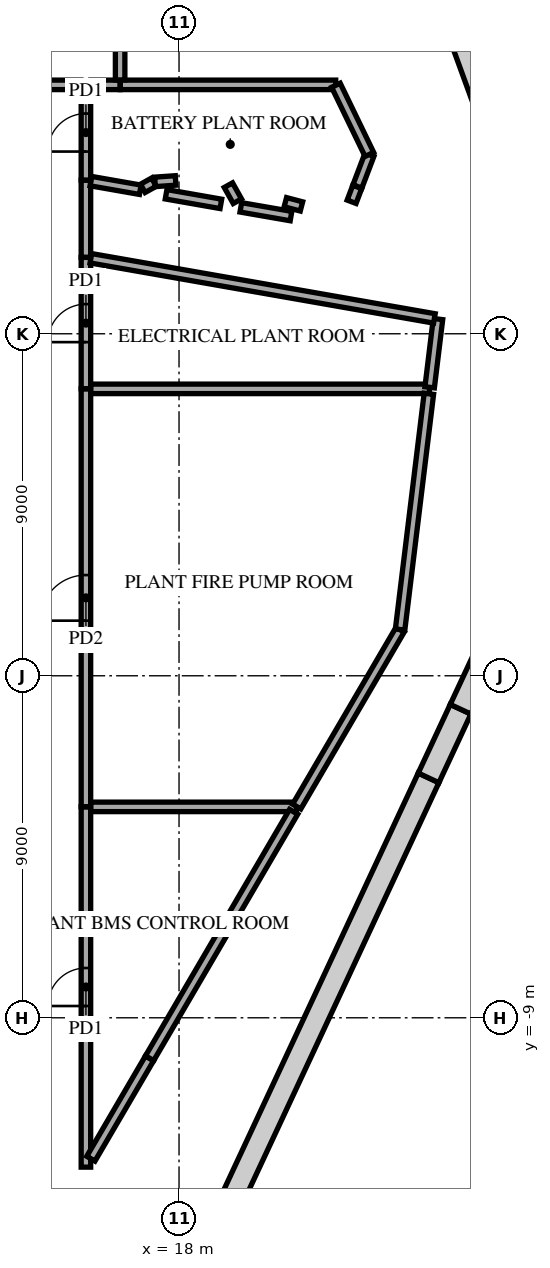
"""IFC4 building model, lengths in metres.
Left out: names, types, materials, properties, quantities, classifications, styles, units other than length and angle.
Written with IfcOpenShell. Run it as: python <this file> out.ifc"""

import sys

from ifc_helpers import new_model, si_unit, direction, frame, frame_2d, origin, place, context, subcontext, project, spatial, rectangle, extrude, element, fill, save


model = new_model("IFC4")
c1 = context("Model", 3, precision=1e-05, world=origin(), true_north=direction((0.0, 1.0)))
c2 = subcontext(c1, "Body", "Model", "MODEL_VIEW")
j1 = project(units=[si_unit("LENGTHUNIT", "METRE"), si_unit("PLANEANGLEUNIT", "RADIAN")], contexts=[c1])
p1 = place(None, origin())
s1 = spatial("IfcSite", under=j1, at=p1, CompositionType="ELEMENT")
p2 = place(p1, origin())
s2 = spatial("IfcBuilding", under=s1, at=p2, CompositionType="ELEMENT")
p3 = place(p2, frame((0.0, 0.0, 290.9)))
s3 = spatial("IfcBuildingStorey", under=s2, at=p3, CompositionType="ELEMENT", Elevation=290.9)
p4 = place(p3, frame((15.55, -12.93, 0.0), z_axis=(0.0, 0.0, 1.0), x_axis=(0.0, 1.0, 0.0)))
e1 = element("IfcWall", 1, at=p4, inside=s3, PredefinedType="PARTITIONING", context=c2, shape_type="SweptSolid", body=[
    extrude(rectangle(XDim=9.48, YDim=0.25, at=frame_2d((4.74, 0.0))), origin(), (0.0, 0.0, 1.0), 4.73),
])
p5 = place(p4, frame((4.24, 0.0, 0.0)))
e2 = element("IfcOpeningElement", 2, at=p5, cuts=e1, PredefinedType="OPENING", context=c2, shape_type="SweptSolid", body=[
    extrude(rectangle(XDim=1.0, YDim=2.1, at=frame_2d((0.5, 1.05))), frame((0.0, 0.135, 0.0), z_axis=(0.0, -1.0, 0.0), x_axis=(1.0, 0.0, 0.0)), (0.0, 0.0, 1.0), 0.27),
])
p6 = place(p3, frame((15.68, -12.708, 0.0), z_axis=(0.0, 0.0, 1.0), x_axis=(0.504610530245, 0.863347098661, 0.0)))
e3 = element("IfcWall", 3, at=p6, inside=s3, PredefinedType="PARTITIONING", context=c2, shape_type="SweptSolid", body=[
    extrude(rectangle(XDim=3.058, YDim=0.25, at=frame_2d((1.529, 0.0))), origin(), (0.0, 0.0, 1.0), 4.73),
])
p7 = place(p3, frame((15.55, -3.445, 0.0), z_axis=(0.0, 0.0, 1.0), x_axis=(0.0, 1.0, 0.0)))
e4 = element("IfcWall", 4, at=p7, inside=s3, PredefinedType="PARTITIONING", context=c2, shape_type="SweptSolid", body=[
    extrude(rectangle(XDim=10.995, YDim=0.25, at=frame_2d((5.498, 0.0))), origin(), (0.0, 0.0, 1.0), 4.73),
])
p8 = place(p7, frame((4.895, 0.0, 0.0)))
e5 = element("IfcOpeningElement", 5, at=p8, cuts=e4, PredefinedType="OPENING", context=c2, shape_type="SweptSolid", body=[
    extrude(rectangle(XDim=1.2, YDim=2.1, at=frame_2d((0.6, 1.05))), frame((0.0, 0.135, 0.0), z_axis=(0.0, -1.0, 0.0), x_axis=(1.0, 0.0, 0.0)), (0.0, 0.0, 1.0), 0.27),
])
p9 = place(p3, frame((15.68, -3.45, 0.0), z_axis=(0.0, 0.0, 1.0), x_axis=(1.0, 0.0, 0.0)))
e6 = element("IfcWall", 6, at=p9, inside=s3, PredefinedType="PARTITIONING", context=c2, shape_type="SweptSolid", body=[
    extrude(rectangle(XDim=5.412, YDim=0.25, at=frame_2d((2.706, 0.0))), origin(), (0.0, 0.0, 1.0), 5.25),
])
p10 = place(p3, frame((17.226, -10.064, 0.0), z_axis=(0.0, 0.0, 1.0), x_axis=(0.504657076942, 0.863319891287, 0.0)))
e7 = element("IfcWall", 7, at=p10, inside=s3, PredefinedType="PARTITIONING", context=c2, shape_type="SweptSolid", body=[
    extrude(rectangle(XDim=7.51, YDim=0.25, at=frame_2d((3.755, 0.0))), origin(), (0.0, 0.0, 1.0), 4.73),
])
p11 = place(p3, frame((21.097, -3.441, 0.0), z_axis=(0.0, 0.0, 1.0), x_axis=(0.504676330885, 0.86330863603, 0.0)))
e8 = element("IfcWall", 8, at=p11, inside=s3, PredefinedType="PARTITIONING", context=c2, shape_type="SweptSolid", body=[
    extrude(rectangle(XDim=5.39, YDim=0.25, at=frame_2d((2.695, 0.0))), origin(), (0.0, 0.0, 1.0), 4.73),
])
p12 = place(p3, frame((15.55, 7.555, 0.0), z_axis=(0.0, 0.0, 1.0), x_axis=(0.0, 1.0, 0.0)))
e9 = element("IfcWall", 9, at=p12, inside=s3, PredefinedType="PARTITIONING", context=c2, shape_type="SweptSolid", body=[
    extrude(rectangle(XDim=3.455, YDim=0.25, at=frame_2d((1.727, 0.0))), origin(), (0.0, 0.0, 1.0), 4.73),
])
p13 = place(p12, frame((1.225, 0.0, 0.0)))
e10 = element("IfcOpeningElement", 10, at=p13, cuts=e9, PredefinedType="OPENING", context=c2, shape_type="SweptSolid", body=[
    extrude(rectangle(XDim=1.0, YDim=2.1, at=frame_2d((0.5, 1.05))), frame((0.0, 0.135, 0.0), z_axis=(0.0, -1.0, 0.0), x_axis=(1.0, 0.0, 0.0)), (0.0, 0.0, 1.0), 0.27),
])
p14 = place(p3, frame((15.68, 7.55, 0.0), z_axis=(0.0, 0.0, 1.0), x_axis=(1.0, 0.0, 0.0)))
e11 = element("IfcWall", 11, at=p14, inside=s3, PredefinedType="PARTITIONING", context=c2, shape_type="SweptSolid", body=[
    extrude(rectangle(XDim=8.91, YDim=0.25, at=frame_2d((4.455, 0.0))), origin(), (0.0, 0.0, 1.0), 5.25),
])
p15 = place(p3, frame((23.817, 1.217, 0.0), z_axis=(0.0, 0.0, 1.0), x_axis=(0.121149204596, 0.992634308407, 0.0)))
e12 = element("IfcWall", 12, at=p15, inside=s3, PredefinedType="PARTITIONING", context=c2, shape_type="SweptSolid", body=[
    extrude(rectangle(XDim=6.249, YDim=0.25, at=frame_2d((3.125, 0.0))), origin(), (0.0, 0.0, 1.0), 4.73),
])
p16 = place(p3, frame((24.595, 7.591, 0.0), z_axis=(0.0, 0.0, 1.0), x_axis=(0.121161380242, 0.992632822315, 0.0)))
e13 = element("IfcWall", 13, at=p16, inside=s3, PredefinedType="PARTITIONING", context=c2, shape_type="SweptSolid", body=[
    extrude(rectangle(XDim=1.81, YDim=0.25, at=frame_2d((0.905, 0.0))), origin(), (0.0, 0.0, 1.0), 5.25),
])
p17 = place(p3, frame((15.55, 11.014, 0.0), z_axis=(0.0, 0.0, 1.0), x_axis=(0.0, 1.0, 0.0)))
e14 = element("IfcWall", 14, at=p17, inside=s3, PredefinedType="PARTITIONING", context=c2, shape_type="SweptSolid", body=[
    extrude(rectangle(XDim=2.025, YDim=0.25, at=frame_2d((1.013, 0.0))), origin(), (0.0, 0.0, 1.0), 5.25),
])
p18 = place(p3, frame((15.68, 10.987, 0.0), z_axis=(0.0, 0.0, 1.0), x_axis=(0.985009567224, -0.172499717323, 0.0)))
e15 = element("IfcWall", 15, at=p18, inside=s3, PredefinedType="PARTITIONING", context=c2, shape_type="SweptSolid", body=[
    extrude(rectangle(XDim=9.177, YDim=0.25, at=frame_2d((4.588, 0.0))), origin(), (0.0, 0.0, 1.0), 4.73),
])
p19 = place(p3, frame((19.626, 12.326, 0.0), z_axis=(0.0, 0.0, 1.0), x_axis=(0.985238475206, -0.171187461496, 0.0)))
e16 = element("IfcWall", 16, at=p19, inside=s3, PredefinedType="PARTITIONING", context=c2, shape_type="SweptSolid", body=[
    extrude(rectangle(XDim=1.341, YDim=0.25, at=frame_2d((0.67, 0.0))), origin(), (0.0, 0.0, 1.0), 5.25),
])
p20 = place(p3, frame((20.798, 12.462, 0.0), z_axis=(0.0, 0.0, 1.0), x_axis=(0.966951840267, -0.254959092022, 0.0)))
e17 = element("IfcWall", 17, at=p20, inside=s3, PredefinedType="PARTITIONING", context=c2, shape_type="SweptSolid", body=[
    extrude(rectangle(XDim=0.438, YDim=0.25, at=frame_2d((0.219, 0.0))), origin(), (0.0, 0.0, 1.0), 5.25),
])
p21 = place(p3, frame((17.66, 12.67, 0.0), z_axis=(0.0, 0.0, 1.0), x_axis=(0.985007795471, -0.172509834098, 0.0)))
e18 = element("IfcWall", 18, at=p21, inside=s3, PredefinedType="PARTITIONING", context=c2, shape_type="SweptSolid", body=[
    extrude(rectangle(XDim=1.463, YDim=0.25, at=frame_2d((0.732, 0.0))), origin(), (0.0, 0.0, 1.0), 5.25),
])
p22 = place(p3, frame((19.299, 12.91, 0.0), z_axis=(0.0, 0.0, 1.0), x_axis=(0.488126794077, -0.872772726948, 0.0)))
e19 = element("IfcWall", 19, at=p22, inside=s3, PredefinedType="PARTITIONING", context=c2, shape_type="SweptSolid", body=[
    extrude(rectangle(XDim=0.484, YDim=0.25, at=frame_2d((0.242, 0.0))), origin(), (0.0, 0.0, 1.0), 5.25),
])
p23 = place(p3, frame((15.68, 13.017, 0.0), z_axis=(0.0, 0.0, 1.0), x_axis=(0.985021041015, -0.172434186744, 0.0)))
e20 = element("IfcWall", 20, at=p23, inside=s3, PredefinedType="PARTITIONING", context=c2, shape_type="SweptSolid", body=[
    extrude(rectangle(XDim=1.32, YDim=0.25, at=frame_2d((0.66, 0.0))), origin(), (0.0, 0.0, 1.0), 5.25),
])
p24 = place(p3, frame((22.541, 12.473, 0.0), z_axis=(0.0, 0.0, 1.0), x_axis=(0.354513380096, 0.935050941571, 0.0)))
e21 = element("IfcWall", 21, at=p24, inside=s3, PredefinedType="PARTITIONING", context=c2, shape_type="SweptSolid", body=[
    extrude(rectangle(XDim=0.418, YDim=0.25, at=frame_2d((0.209, 0.0))), origin(), (0.0, 0.0, 1.0), 5.25),
])
p25 = place(p3, frame((17.046, 12.826, 0.0), z_axis=(0.0, 0.0, 1.0), x_axis=(0.874843598419, 0.484405489549, 0.0)))
e22 = element("IfcWall", 22, at=p25, inside=s3, PredefinedType="PARTITIONING", context=c2, shape_type="SweptSolid", body=[
    extrude(rectangle(XDim=0.335, YDim=0.25, at=frame_2d((0.167, 0.0))), origin(), (0.0, 0.0, 1.0), 5.25),
])
p26 = place(p3, frame((17.368, 12.997, 0.0), z_axis=(0.0, 0.0, 1.0), x_axis=(0.997609037461, 0.069110117755, 0.0)))
e23 = element("IfcWall", 23, at=p26, inside=s3, PredefinedType="PARTITIONING", context=c2, shape_type="SweptSolid", body=[
    extrude(rectangle(XDim=0.544, YDim=0.25, at=frame_2d((0.272, 0.0))), origin(), (0.0, 0.0, 1.0), 5.25),
])
p27 = place(p3, frame((15.55, 13.045, 0.0), z_axis=(0.0, 0.0, 1.0), x_axis=(0.0, 1.0, 0.0)))
e24 = element("IfcWall", 24, at=p27, inside=s3, PredefinedType="PARTITIONING", context=c2, shape_type="SweptSolid", body=[
    extrude(rectangle(XDim=2.505, YDim=0.25, at=frame_2d((1.252, 0.0))), origin(), (0.0, 0.0, 1.0), 4.73),
])
p28 = place(p27, frame((0.75, 0.0, 0.0)))
e25 = element("IfcOpeningElement", 25, at=p28, cuts=e24, PredefinedType="OPENING", context=c2, shape_type="SweptSolid", body=[
    extrude(rectangle(XDim=1.0, YDim=2.1, at=frame_2d((0.5, 1.05))), frame((0.0, 0.135, 0.0), z_axis=(0.0, -1.0, 0.0), x_axis=(1.0, 0.0, 0.0)), (0.0, 0.0, 1.0), 0.27),
])
p29 = place(p3, frame((22.694, 12.877, 0.0), z_axis=(0.0, 0.0, 1.0), x_axis=(0.35491738189, 0.934897669284, 0.0)))
e26 = element("IfcWall", 26, at=p29, inside=s3, PredefinedType="PARTITIONING", context=c2, shape_type="SweptSolid", body=[
    extrude(rectangle(XDim=0.895, YDim=0.25, at=frame_2d((0.448, 0.0))), origin(), (0.0, 0.0, 1.0), 5.25),
])
p30 = place(p3, frame((5.455, 15.55, 0.0), z_axis=(0.0, 0.0, 1.0), x_axis=(1.0, 0.0, 0.0)))
e27 = element("IfcWall", 27, at=p30, inside=s3, PredefinedType="PARTITIONING", context=c2, shape_type="SweptSolid", body=[
    extrude(rectangle(XDim=9.965, YDim=0.25, at=frame_2d((4.982, 0.0))), origin(), (0.0, 0.0, 1.0), 4.73),
])
p31 = place(p30, frame((4.445, 0.0, 0.0)))
e28 = element("IfcOpeningElement", 28, at=p31, cuts=e27, PredefinedType="OPENING", context=c2, shape_type="SweptSolid", body=[
    extrude(rectangle(XDim=1.2, YDim=2.1, at=frame_2d((0.6, 1.05))), frame((0.0, 0.135, 0.0), z_axis=(0.0, -1.0, 0.0), x_axis=(1.0, 0.0, 0.0)), (0.0, 0.0, 1.0), 0.27),
])
p32 = place(p3, frame((15.68, 15.55, 0.0), z_axis=(0.0, 0.0, 1.0), x_axis=(1.0, 0.0, 0.0)))
e29 = element("IfcWall", 29, at=p32, inside=s3, PredefinedType="PARTITIONING", context=c2, shape_type="SweptSolid", body=[
    extrude(rectangle(XDim=0.77, YDim=0.25, at=frame_2d((0.385, 0.0))), origin(), (0.0, 0.0, 1.0), 5.25),
])
p33 = place(p3, frame((16.455, 15.55, 0.0), z_axis=(0.0, 0.0, 1.0), x_axis=(1.0, 0.0, 0.0)))
e30 = element("IfcWall", 30, at=p33, inside=s3, PredefinedType="PARTITIONING", context=c2, shape_type="SweptSolid", body=[
    extrude(rectangle(XDim=5.668, YDim=0.25, at=frame_2d((2.834, 0.0))), origin(), (0.0, 0.0, 1.0), 4.73),
])
p34 = place(p3, frame((22.128, 15.54, 0.0), z_axis=(0.0, 0.0, 1.0), x_axis=(0.435485167272, -0.900195905948, 0.0)))
e31 = element("IfcWall", 31, at=p34, inside=s3, PredefinedType="PARTITIONING", context=c2, shape_type="SweptSolid", body=[
    extrude(rectangle(XDim=2.021, YDim=0.25, at=frame_2d((1.011, 0.0))), origin(), (0.0, 0.0, 1.0), 4.43),
])
p35 = place(p3, frame((16.45, 15.68, 0.0), z_axis=(0.0, 0.0, 1.0), x_axis=(0.0, 1.0, 0.0)))
e32 = element("IfcWall", 32, at=p35, inside=s3, PredefinedType="PARTITIONING", context=c2, shape_type="SweptSolid", body=[
    extrude(rectangle(XDim=3.952, YDim=0.25, at=frame_2d((1.976, 0.0))), origin(), (0.0, 0.0, 1.0), 4.73),
])
p36 = place(p3, frame((10.92, -31.952, 0.0), z_axis=(0.0, 0.0, 1.0), x_axis=(0.422622196878, 0.906305952042, 0.0)))
e33 = element("IfcWall", 33, at=p36, inside=s3, PredefinedType="STANDARD", context=c2, shape_type="SweptSolid", body=[
    extrude(rectangle(XDim=32.29, YDim=0.6, at=frame_2d((16.145, 0.0))), origin(), (0.0, 0.0, 1.0), 5.25),
])
p37 = place(p36, frame((1.213, 0.0, 0.6)))
e34 = element("IfcOpeningElement", 34, at=p37, cuts=e33, PredefinedType="OPENING", context=c2, shape_type="SweptSolid", body=[
    extrude(rectangle(XDim=2.0, YDim=4.2, at=frame_2d((1.0, 2.1))), frame((0.0, 0.31, 0.0), z_axis=(0.0, -1.0, 0.0), x_axis=(1.0, 0.0, 0.0)), (0.0, 0.0, 1.0), 0.62),
])
p38 = place(p3, frame((24.566, -2.687, 0.0), z_axis=(0.0, 0.0, 1.0), x_axis=(0.422597096173, 0.906317656402, 0.0)))
e35 = element("IfcWall", 35, at=p38, inside=s3, PredefinedType="STANDARD", context=c2, shape_type="SweptSolid", body=[
    extrude(rectangle(XDim=1.993, YDim=0.6, at=frame_2d((0.997, 0.0))), origin(), (0.0, 0.0, 1.0), 4.436),
])
p39 = place(p3, frame((25.408, -0.881, 0.0), z_axis=(0.0, 0.0, 1.0), x_axis=(0.42260230904, 0.906315225732, 0.0)))
e36 = element("IfcWall", 36, at=p39, inside=s3, PredefinedType="STANDARD", context=c2, shape_type="SweptSolid", body=[
    extrude(rectangle(XDim=5.381, YDim=0.6, at=frame_2d((2.691, 0.0))), origin(), (0.0, 0.0, 1.0), 4.436),
])
p40 = place(p3, frame((26.078, 15.001, 0.0), z_axis=(0.0, 0.0, 1.0), x_axis=(-0.342012214298, 0.939695506678, 0.0)))
e37 = element("IfcWall", 37, at=p40, inside=s3, PredefinedType="STANDARD", context=c2, shape_type="SweptSolid", body=[
    extrude(rectangle(XDim=3.277, YDim=0.6, at=frame_2d((1.639, 0.0))), origin(), (0.0, 0.0, 1.0), 5.25),
])
p41 = place(p28, origin())
e38 = element("IfcDoor", 38, at=p41, inside=s3, OperationType="SINGLE_SWING_LEFT", PredefinedType="DOOR", context=c2, shape_type="SweptSolid", body=[
    extrude(rectangle(XDim=1.0, YDim=2.1, at=frame_2d((0.5, 1.05))), frame((0.0, 0.025, 0.0), z_axis=(0.0, -1.0, 0.0), x_axis=(1.0, 0.0, 0.0)), (0.0, 0.0, 1.0), 0.05),
])
fill(e25, e38)
p42 = place(p13, origin())
e39 = element("IfcDoor", 39, at=p42, inside=s3, OperationType="SINGLE_SWING_RIGHT", PredefinedType="DOOR", context=c2, shape_type="SweptSolid", body=[
    extrude(rectangle(XDim=1.0, YDim=2.1, at=frame_2d((0.5, 1.05))), frame((0.0, 0.025, 0.0), z_axis=(0.0, -1.0, 0.0), x_axis=(1.0, 0.0, 0.0)), (0.0, 0.0, 1.0), 0.05),
])
fill(e10, e39)
p43 = place(p8, origin())
e40 = element("IfcDoor", 40, at=p43, inside=s3, OperationType="SINGLE_SWING_LEFT", PredefinedType="DOOR", context=c2, shape_type="SweptSolid", body=[
    extrude(rectangle(XDim=1.2, YDim=2.1, at=frame_2d((0.6, 1.05))), frame((0.0, 0.025, 0.0), z_axis=(0.0, -1.0, 0.0), x_axis=(1.0, 0.0, 0.0)), (0.0, 0.0, 1.0), 0.05),
])
fill(e5, e40)
p44 = place(p5, origin())
e41 = element("IfcDoor", 41, at=p44, inside=s3, OperationType="SINGLE_SWING_RIGHT", PredefinedType="DOOR", context=c2, shape_type="SweptSolid", body=[
    extrude(rectangle(XDim=1.0, YDim=2.1, at=frame_2d((0.5, 1.05))), frame((0.0, 0.025, 0.0), z_axis=(0.0, -1.0, 0.0), x_axis=(1.0, 0.0, 0.0)), (0.0, 0.0, 1.0), 0.05),
])
fill(e2, e41)
save(model, sys.argv[1])
